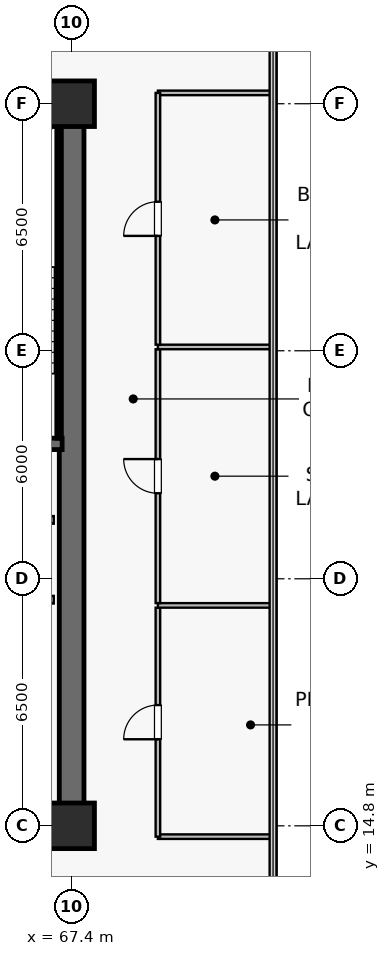
"""IFC4 building model, lengths in metres.
Left out: names, types, materials, properties, quantities, classifications, styles, units other than length and angle.
Written with IfcOpenShell. Run it as: python <this file> out.ifc"""

import sys

from ifc_helpers import new_model, si_unit, direction, frame, frame_2d, origin, origin_2d, place, context, subcontext, project, spatial, rectangle, extrude, source, transform, mapped, element, fill, save


model = new_model("IFC4")
c1 = context("Model", 3, precision=1e-05, world=origin(), true_north=direction((0.0, 1.0)))
c2 = subcontext(c1, "Body", "Model", "MODEL_VIEW")
j1 = project(units=[si_unit("LENGTHUNIT", "METRE"), si_unit("PLANEANGLEUNIT", "RADIAN")], contexts=[c1])
p1 = place(None, origin())
s1 = spatial("IfcSite", under=j1, at=p1, CompositionType="ELEMENT")
p2 = place(p1, origin())
s2 = spatial("IfcBuilding", under=s1, at=p2, CompositionType="ELEMENT")
p3 = place(p2, frame((0.0, 0.0, 117.4)))
s3 = spatial("IfcBuildingStorey", under=s2, at=p3, CompositionType="ELEMENT", Elevation=117.4)
p4 = place(p3, frame((52.275, 14.8, 0.0), z_axis=(0.0, 0.0, 1.0), x_axis=(1.0, 0.0, 0.0)))
e1 = element("IfcWall", 1, at=p4, inside=s3, PredefinedType="SHEAR", context=c2, shape_type="SweptSolid", body=[
    extrude(rectangle(XDim=15.45, YDim=0.65, at=frame_2d((7.725, 0.0))), origin(), (0.0, 0.0, 1.0), 3.79),
])
p5 = place(p3, frame((52.275, 33.8, 0.0), z_axis=(0.0, 0.0, 1.0), x_axis=(1.0, 0.0, 0.0)))
e2 = element("IfcWall", 2, at=p5, inside=s3, PredefinedType="SHEAR", context=c2, shape_type="SweptSolid", body=[
    extrude(rectangle(XDim=15.45, YDim=0.65, at=frame_2d((7.725, 0.0))), origin(), (0.0, 0.0, 1.0), 3.79),
])
p6 = place(p5, frame((8.825, 0.0, 0.0)))
e3 = element("IfcOpeningElement", 3, at=p6, cuts=e2, PredefinedType="OPENING", context=c2, shape_type="SweptSolid", body=[
    extrude(rectangle(XDim=0.95, YDim=2.15, at=frame_2d((0.475, 1.075))), frame((0.0, 0.335, 0.0), z_axis=(0.0, -1.0, 0.0), x_axis=(1.0, 0.0, 0.0)), (0.0, 0.0, 1.0), 0.67),
])
p7 = place(p5, frame((5.46, 0.0, 0.0)))
e4 = element("IfcOpeningElement", 4, at=p7, cuts=e2, PredefinedType="OPENING", context=c2, shape_type="SweptSolid", body=[
    extrude(rectangle(XDim=0.95, YDim=2.15, at=frame_2d((0.475, 1.075))), frame((0.0, 0.335, 0.0), z_axis=(0.0, -1.0, 0.0), x_axis=(1.0, 0.0, 0.0)), (0.0, 0.0, 1.0), 0.67),
])
p8 = place(p5, frame((2.06, 0.0, 0.0)))
e5 = element("IfcOpeningElement", 5, at=p8, cuts=e2, PredefinedType="OPENING", context=c2, shape_type="SweptSolid", body=[
    extrude(rectangle(XDim=0.95, YDim=2.15, at=frame_2d((0.475, 1.075))), frame((0.0, 0.335, 0.0), z_axis=(0.0, -1.0, 0.0), x_axis=(1.0, 0.0, 0.0)), (0.0, 0.0, 1.0), 0.67),
])
p9 = place(p3, frame((67.4, 15.125, 0.0), z_axis=(0.0, 0.0, 1.0), x_axis=(0.0, 1.0, 0.0)))
e6 = element("IfcWall", 6, at=p9, inside=s3, PredefinedType="SHEAR", context=c2, shape_type="SweptSolid", body=[
    extrude(rectangle(XDim=18.35, YDim=0.65, at=frame_2d((9.175, 0.0))), origin(), (0.0, 0.0, 1.0), 3.79),
])
p10 = place(p3, frame((63.35, 24.85, 0.0), z_axis=(0.0, 0.0, 1.0), x_axis=(1.0, 0.0, 0.0)))
e7 = element("IfcWall", 7, at=p10, inside=s3, PredefinedType="SHEAR", context=c2, shape_type="SweptSolid", body=[
    extrude(rectangle(XDim=3.8, YDim=0.3, at=frame_2d((1.9, 0.0))), origin(), (0.0, 0.0, 1.0), 3.79),
])
p11 = place(p3, frame((63.35, 33.4, 0.0), z_axis=(0.0, 0.0, 1.0), x_axis=(1.0, 0.0, 0.0)))
e8 = element("IfcWall", 8, at=p11, inside=s3, PredefinedType="SOLIDWALL", context=c2, shape_type="SweptSolid", body=[
    extrude(rectangle(XDim=3.72, YDim=0.12, at=frame_2d((1.86, 0.0))), origin(), (0.0, 0.0, 1.0), 3.79),
])
p12 = place(p3, frame((67.07, 25.0, 0.0), z_axis=(0.0, 0.0, 1.0), x_axis=(0.0, 1.0, 0.0)))
e9 = element("IfcWall", 9, at=p12, inside=s3, PredefinedType="SOLIDWALL", context=c2, shape_type="SweptSolid", body=[
    extrude(rectangle(XDim=8.32, YDim=0.12, at=frame_2d((4.16, 0.0))), origin(), (0.0, 0.0, 1.0), 3.79),
])
m1 = source(origin(), c2, "Body", "SweptSolid", [
    extrude(rectangle(XDim=1.2, YDim=1.2, at=origin_2d()), origin(), (0.0, 0.0, 1.0), 4.1),
])
for number, where, z_axis, x_axis in (
    (10, (67.4, 14.8, 0.0), (0.0, 0.0, 1.0), (1.0, 0.0, 0.0)),
    (11, (67.4, 33.8, 0.0), (0.0, 0.0, 1.0), (1.0, 0.0, 0.0)),
):
    element("IfcColumn", number, at=place(p3, frame(where, z_axis=z_axis, x_axis=x_axis)), inside=s3, PredefinedType="COLUMN", context=c2, shape_type="MappedRepresentation", body=[
        mapped(m1, transform((0.0, 0.0, 0.0), scale=1.0)),
    ])
for number, where, z_axis, x_axis in (
    (12, (64.67, 20.75, 0.0), (0.0, 0.0, 1.0), (1.0, 0.0, 0.0)),
    (13, (64.67, 22.85, 0.0), (0.0, 0.0, 1.0), (1.0, 0.0, 0.0)),
):
    element("IfcWall", number, at=place(p3, frame(where, z_axis=z_axis, x_axis=x_axis)), inside=s3, PredefinedType="SOLIDWALL", context=c2, shape_type="SweptSolid", body=[
        extrude(rectangle(XDim=2.26, YDim=0.2, at=frame_2d((1.13, 0.0))), origin(), (0.0, 0.0, 1.0), 3.79),
    ])
for number, where, z_axis, x_axis in (
    (14, (69.67, 14.515, 0.0), (0.0, 0.0, 1.0), (1.0, 0.0, 0.0)),
    (15, (69.67, 34.085, 0.0), (0.0, 0.0, 1.0), (1.0, 0.0, 0.0)),
):
    element("IfcWall", number, at=place(p3, frame(where, z_axis=z_axis, x_axis=x_axis)), inside=s3, PredefinedType="PARTITIONING", context=c2, shape_type="SweptSolid", body=[
        extrude(rectangle(XDim=3.02, YDim=0.12, at=frame_2d((1.51, 0.0))), origin(), (0.0, 0.0, 1.0), 3.79),
    ])
p13 = place(p3, frame((69.67, 14.515, 0.0), z_axis=(0.0, 0.0, 1.0), x_axis=(0.0, 1.0, 0.0)))
e16 = element("IfcWall", 16, at=p13, inside=s3, PredefinedType="PARTITIONING", context=c2, shape_type="SweptSolid", body=[
    extrude(rectangle(XDim=6.025, YDim=0.12, at=frame_2d((3.013, 0.0))), origin(), (0.0, 0.0, 1.0), 3.79),
])
p14 = place(p13, frame((2.562, 0.0, 0.0)))
e17 = element("IfcOpeningElement", 17, at=p14, cuts=e16, PredefinedType="OPENING", context=c2, shape_type="SweptSolid", body=[
    extrude(rectangle(XDim=0.9, YDim=2.1, at=frame_2d((0.45, 1.05))), frame((0.0, 0.07, 0.0), z_axis=(0.0, -1.0, 0.0), x_axis=(1.0, 0.0, 0.0)), (0.0, 0.0, 1.0), 0.14),
])
p15 = place(p3, frame((69.67, 20.6, 0.0), z_axis=(0.0, 0.0, 1.0), x_axis=(1.0, 0.0, 0.0)))
e18 = element("IfcWall", 18, at=p15, inside=s3, PredefinedType="PARTITIONING", context=c2, shape_type="SweptSolid", body=[
    extrude(rectangle(XDim=3.02, YDim=0.12, at=frame_2d((1.51, 0.0))), origin(), (0.0, 0.0, 1.0), 3.79),
])
p16 = place(p3, frame((69.67, 20.66, 0.0), z_axis=(0.0, 0.0, 1.0), x_axis=(0.0, 1.0, 0.0)))
e19 = element("IfcWall", 19, at=p16, inside=s3, PredefinedType="PARTITIONING", context=c2, shape_type="SweptSolid", body=[
    extrude(rectangle(XDim=6.68, YDim=0.12, at=frame_2d((3.34, 0.0))), origin(), (0.0, 0.0, 1.0), 3.79),
])
p17 = place(p16, frame((2.89, 0.0, 0.0)))
e20 = element("IfcOpeningElement", 20, at=p17, cuts=e19, PredefinedType="OPENING", context=c2, shape_type="SweptSolid", body=[
    extrude(rectangle(XDim=0.9, YDim=2.1, at=frame_2d((0.45, 1.05))), frame((0.0, 0.07, 0.0), z_axis=(0.0, -1.0, 0.0), x_axis=(1.0, 0.0, 0.0)), (0.0, 0.0, 1.0), 0.14),
])
p18 = place(p3, frame((69.67, 27.4, 0.0), z_axis=(0.0, 0.0, 1.0), x_axis=(1.0, 0.0, 0.0)))
e21 = element("IfcWall", 21, at=p18, inside=s3, PredefinedType="PARTITIONING", context=c2, shape_type="SweptSolid", body=[
    extrude(rectangle(XDim=3.02, YDim=0.12, at=frame_2d((1.51, 0.0))), origin(), (0.0, 0.0, 1.0), 3.79),
])
p19 = place(p3, frame((69.67, 27.46, 0.0), z_axis=(0.0, 0.0, 1.0), x_axis=(0.0, 1.0, 0.0)))
e22 = element("IfcWall", 22, at=p19, inside=s3, PredefinedType="PARTITIONING", context=c2, shape_type="SweptSolid", body=[
    extrude(rectangle(XDim=6.625, YDim=0.12, at=frame_2d((3.312, 0.0))), origin(), (0.0, 0.0, 1.0), 3.79),
])
p20 = place(p19, frame((2.863, 0.0, 0.0)))
e23 = element("IfcOpeningElement", 23, at=p20, cuts=e22, PredefinedType="OPENING", context=c2, shape_type="SweptSolid", body=[
    extrude(rectangle(XDim=0.9, YDim=2.1, at=frame_2d((0.45, 1.05))), frame((0.0, 0.07, 0.0), z_axis=(0.0, -1.0, 0.0), x_axis=(1.0, 0.0, 0.0)), (0.0, 0.0, 1.0), 0.14),
])
m2 = source(origin(), c2, "Body", "SweptSolid", [
    extrude(rectangle(XDim=0.9, YDim=2.1, at=frame_2d((0.45, 1.05))), frame((0.0, 0.025, 0.0), z_axis=(0.0, -1.0, 0.0), x_axis=(1.0, 0.0, 0.0)), (0.0, 0.0, 1.0), 0.05),
])
p21 = place(p14, origin())
e24 = element("IfcDoor", 24, at=p21, inside=s3, OperationType="SINGLE_SWING_LEFT", PredefinedType="DOOR", context=c2, shape_type="MappedRepresentation", body=[
    mapped(m2, transform((0.0, 0.0, 0.0), scale=1.0)),
])
fill(e17, e24)
p22 = place(p17, origin())
e25 = element("IfcDoor", 25, at=p22, inside=s3, OperationType="SINGLE_SWING_RIGHT", PredefinedType="DOOR", context=c2, shape_type="MappedRepresentation", body=[
    mapped(m2, transform((0.0, 0.0, 0.0), scale=1.0)),
])
fill(e20, e25)
p23 = place(p20, origin())
e26 = element("IfcDoor", 26, at=p23, inside=s3, OperationType="SINGLE_SWING_LEFT", PredefinedType="DOOR", context=c2, shape_type="MappedRepresentation", body=[
    mapped(m2, transform((0.0, 0.0, 0.0), scale=1.0)),
])
fill(e23, e26)
save(model, sys.argv[1])
